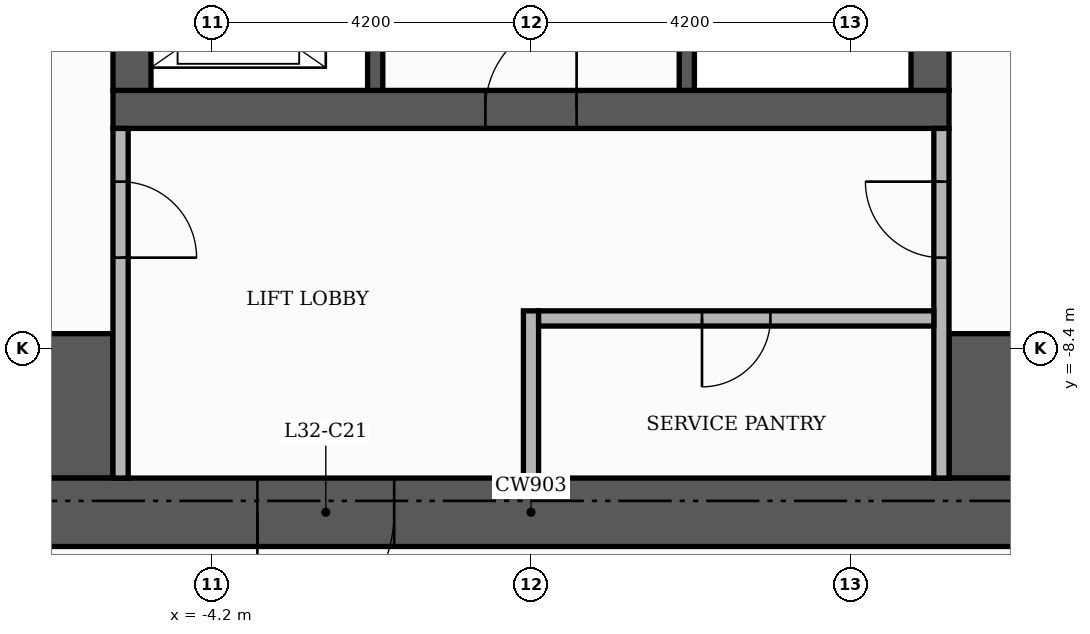
"""IFC4 building model, lengths in metres.
Left out: names, types, materials, properties, quantities, classifications, styles, units other than length and angle.
Written with IfcOpenShell. Run it as: python <this file> out.ifc"""

import sys

from ifc_helpers import new_model, si_unit, direction, frame, frame_2d, origin, place, context, subcontext, project, spatial, rectangle, extrude, element, fill, save


model = new_model("IFC4")
c1 = context("Model", 3, precision=1e-05, world=origin(), true_north=direction((0.0, 1.0)))
c2 = subcontext(c1, "Body", "Model", "MODEL_VIEW")
j1 = project(units=[si_unit("LENGTHUNIT", "METRE"), si_unit("PLANEANGLEUNIT", "RADIAN")], contexts=[c1])
p1 = place(None, origin())
s1 = spatial("IfcSite", under=j1, at=p1, CompositionType="ELEMENT")
p2 = place(p1, origin())
s2 = spatial("IfcBuilding", under=s1, at=p2, CompositionType="ELEMENT")
p3 = place(p2, frame((0.0, 0.0, 137.7)))
s3 = spatial("IfcBuildingStorey", under=s2, at=p3, CompositionType="ELEMENT", Elevation=137.7)
p4 = place(p3, frame((-5.5, -5.25, 0.0), z_axis=(0.0, 0.0, 1.0), x_axis=(1.0, 0.0, 0.0)))
e1 = element("IfcWall", 1, at=p4, inside=s3, PredefinedType="SHEAR", context=c2, shape_type="SweptSolid", body=[
    extrude(rectangle(XDim=11.0, YDim=0.5, at=frame_2d((5.5, 0.0))), origin(), (0.0, 0.0, 1.0), 3.48),
])
p5 = place(p4, frame((4.9, 0.0, 0.0)))
e2 = element("IfcOpeningElement", 2, at=p5, cuts=e1, PredefinedType="OPENING", context=c2, shape_type="SweptSolid", body=[
    extrude(rectangle(XDim=1.2, YDim=2.1, at=frame_2d((0.6, 1.05))), frame((0.0, 0.26, 0.0), z_axis=(0.0, -1.0, 0.0), x_axis=(1.0, 0.0, 0.0)), (0.0, 0.0, 1.0), 0.52),
])
for number, where, z_axis, x_axis in (
    (3, (-5.25, -5.0, 0.0), (0.0, 0.0, 1.0), (0.0, 1.0, 0.0)),
    (4, (5.25, -5.0, 0.0), (0.0, 0.0, 1.0), (0.0, 1.0, 0.0)),
):
    element("IfcWall", number, at=place(p3, frame(where, z_axis=z_axis, x_axis=x_axis)), inside=s3, PredefinedType="SHEAR", context=c2, shape_type="SweptSolid", body=[
        extrude(rectangle(XDim=10.5, YDim=0.5, at=frame_2d((5.25, 0.0))), origin(), (0.0, 0.0, 1.0), 3.48),
    ])
for number, where, z_axis, x_axis in (
    (5, (-10.1, -9.15, 0.0), (0.0, 0.0, 1.0), (1.0, 0.0, 0.0)),
    (6, (5.5, -9.15, 0.0), (0.0, 0.0, 1.0), (1.0, 0.0, 0.0)),
):
    element("IfcWall", number, at=place(p3, frame(where, z_axis=z_axis, x_axis=x_axis)), inside=s3, PredefinedType="SHEAR", context=c2, shape_type="SweptSolid", body=[
        extrude(rectangle(XDim=4.6, YDim=1.9, at=frame_2d((2.3, 0.0))), origin(), (0.0, 0.0, 1.0), 3.48),
    ])
p6 = place(p3, frame((2.05, -5.0, 0.0), z_axis=(0.0, 0.0, 1.0), x_axis=(0.0, 1.0, 0.0)))
e7 = element("IfcWall", 7, at=p6, inside=s3, PredefinedType="SHEAR", context=c2, shape_type="SweptSolid", body=[
    extrude(rectangle(XDim=6.6, YDim=0.2, at=frame_2d((3.3, 0.0))), origin(), (0.0, 0.0, 1.0), 3.48),
])
p7 = place(p6, frame((5.25, 0.0, 0.0)))
e8 = element("IfcOpeningElement", 8, at=p7, cuts=e7, PredefinedType="OPENING", context=c2, shape_type="SweptSolid", body=[
    extrude(rectangle(XDim=1.0, YDim=2.1, at=frame_2d((0.5, 1.05))), frame((0.0, 0.11, 0.0), z_axis=(0.0, -1.0, 0.0), x_axis=(1.0, 0.0, 0.0)), (0.0, 0.0, 1.0), 0.22),
])
p8 = place(p3, frame((-2.05, -5.0, 0.0), z_axis=(0.0, 0.0, 1.0), x_axis=(0.0, 1.0, 0.0)))
e9 = element("IfcWall", 9, at=p8, inside=s3, PredefinedType="SHEAR", context=c2, shape_type="SweptSolid", body=[
    extrude(rectangle(XDim=3.4, YDim=0.2, at=frame_2d((1.7, 0.0))), origin(), (0.0, 0.0, 1.0), 3.48),
])
p9 = place(p8, frame((0.55, 0.0, 0.0)))
e10 = element("IfcOpeningElement", 10, at=p9, cuts=e9, PredefinedType="OPENING", context=c2, shape_type="SweptSolid", body=[
    extrude(rectangle(XDim=1.1, YDim=2.1, at=frame_2d((0.55, 1.05))), frame((0.0, 0.11, 0.0), z_axis=(0.0, -1.0, 0.0), x_axis=(1.0, 0.0, 0.0)), (0.0, 0.0, 1.0), 0.22),
])
p10 = place(p8, frame((2.45, 0.0, 0.0)))
e11 = element("IfcOpeningElement", 11, at=p10, cuts=e9, PredefinedType="OPENING", context=c2, shape_type="SweptSolid", body=[
    extrude(rectangle(XDim=0.8, YDim=2.1, at=frame_2d((0.4, 1.05))), frame((0.0, 0.11, 0.0), z_axis=(0.0, -1.0, 0.0), x_axis=(1.0, 0.0, 0.0)), (0.0, 0.0, 1.0), 0.22),
])
p11 = place(p3, frame((-11.0, -10.55, 0.0), z_axis=(0.0, 0.0, 1.0), x_axis=(1.0, 0.0, 0.0)))
e12 = element("IfcWall", 12, at=p11, inside=s3, PredefinedType="SHEAR", context=c2, shape_type="SweptSolid", body=[
    extrude(rectangle(XDim=22.0, YDim=0.9, at=frame_2d((11.0, 0.0))), origin(), (0.0, 0.0, 1.0), 3.48),
])
p12 = place(p11, frame((7.4, 0.0, 0.0)))
e13 = element("IfcOpeningElement", 13, at=p12, cuts=e12, PredefinedType="OPENING", context=c2, shape_type="SweptSolid", body=[
    extrude(rectangle(XDim=1.8, YDim=2.2, at=frame_2d((0.9, 1.1))), frame((0.0, 0.46, 0.0), z_axis=(0.0, -1.0, 0.0), x_axis=(1.0, 0.0, 0.0)), (0.0, 0.0, 1.0), 0.92),
])
p13 = place(p3, frame((-5.4, -10.1, 0.0), z_axis=(0.0, 0.0, 1.0), x_axis=(0.0, 1.0, 0.0)))
e14 = element("IfcWall", 14, at=p13, inside=s3, PredefinedType="PARTITIONING", context=c2, shape_type="SweptSolid", body=[
    extrude(rectangle(XDim=4.6, YDim=0.2, at=frame_2d((2.3, 0.0))), origin(), (0.0, 0.0, 1.0), 3.48),
])
p14 = place(p13, frame((2.9, 0.0, 0.0)))
e15 = element("IfcOpeningElement", 15, at=p14, cuts=e14, PredefinedType="OPENING", context=c2, shape_type="SweptSolid", body=[
    extrude(rectangle(XDim=1.0, YDim=2.1, at=frame_2d((0.5, 1.05))), frame((0.0, 0.11, 0.0), z_axis=(0.0, -1.0, 0.0), x_axis=(1.0, 0.0, 0.0)), (0.0, 0.0, 1.0), 0.22),
])
p15 = place(p3, frame((0.0, -10.1, 0.0), z_axis=(0.0, 0.0, 1.0), x_axis=(0.0, 1.0, 0.0)))
e16 = element("IfcWall", 16, at=p15, inside=s3, PredefinedType="PARTITIONING", context=c2, shape_type="SweptSolid", body=[
    extrude(rectangle(XDim=2.2, YDim=0.2, at=frame_2d((1.1, 0.0))), origin(), (0.0, 0.0, 1.0), 3.48),
])
p16 = place(p3, frame((5.4, -10.1, 0.0), z_axis=(0.0, 0.0, 1.0), x_axis=(0.0, 1.0, 0.0)))
e17 = element("IfcWall", 17, at=p16, inside=s3, PredefinedType="PARTITIONING", context=c2, shape_type="SweptSolid", body=[
    extrude(rectangle(XDim=4.6, YDim=0.2, at=frame_2d((2.3, 0.0))), origin(), (0.0, 0.0, 1.0), 3.48),
])
p17 = place(p16, frame((2.9, 0.0, 0.0)))
e18 = element("IfcOpeningElement", 18, at=p17, cuts=e17, PredefinedType="OPENING", context=c2, shape_type="SweptSolid", body=[
    extrude(rectangle(XDim=1.0, YDim=2.1, at=frame_2d((0.5, 1.05))), frame((0.0, 0.11, 0.0), z_axis=(0.0, -1.0, 0.0), x_axis=(1.0, 0.0, 0.0)), (0.0, 0.0, 1.0), 0.22),
])
p18 = place(p3, frame((0.1, -8.0, 0.0), z_axis=(0.0, 0.0, 1.0), x_axis=(1.0, 0.0, 0.0)))
e19 = element("IfcWall", 19, at=p18, inside=s3, PredefinedType="PARTITIONING", context=c2, shape_type="SweptSolid", body=[
    extrude(rectangle(XDim=5.2, YDim=0.2, at=frame_2d((2.6, 0.0))), origin(), (0.0, 0.0, 1.0), 3.48),
])
p19 = place(p18, frame((2.15, 0.0, 0.0)))
e20 = element("IfcOpeningElement", 20, at=p19, cuts=e19, PredefinedType="OPENING", context=c2, shape_type="SweptSolid", body=[
    extrude(rectangle(XDim=0.9, YDim=2.1, at=frame_2d((0.45, 1.05))), frame((0.0, 0.11, 0.0), z_axis=(0.0, -1.0, 0.0), x_axis=(1.0, 0.0, 0.0)), (0.0, 0.0, 1.0), 0.22),
])
p20 = place(p5, origin())
e21 = element("IfcDoor", 21, at=p20, inside=s3, OperationType="SINGLE_SWING_RIGHT", PredefinedType="DOOR", context=c2, shape_type="SweptSolid", body=[
    extrude(rectangle(XDim=1.2, YDim=2.1, at=frame_2d((0.6, 1.05))), frame((0.0, 0.025, 0.0), z_axis=(0.0, -1.0, 0.0), x_axis=(1.0, 0.0, 0.0)), (0.0, 0.0, 1.0), 0.05),
])
fill(e2, e21)
p21 = place(p14, frame((1.0, 0.0, 0.0), z_axis=(0.0, 0.0, 1.0), x_axis=(-1.0, 0.0, 0.0)))
e22 = element("IfcDoor", 22, at=p21, inside=s3, OperationType="SINGLE_SWING_LEFT", PredefinedType="DOOR", context=c2, shape_type="SweptSolid", body=[
    extrude(rectangle(XDim=1.0, YDim=2.1, at=frame_2d((0.5, 1.05))), frame((0.0, 0.025, 0.0), z_axis=(0.0, -1.0, 0.0), x_axis=(1.0, 0.0, 0.0)), (0.0, 0.0, 1.0), 0.05),
])
fill(e15, e22)
p22 = place(p17, origin())
e23 = element("IfcDoor", 23, at=p22, inside=s3, OperationType="SINGLE_SWING_RIGHT", PredefinedType="DOOR", context=c2, shape_type="SweptSolid", body=[
    extrude(rectangle(XDim=1.0, YDim=2.1, at=frame_2d((0.5, 1.05))), frame((0.0, 0.025, 0.0), z_axis=(0.0, -1.0, 0.0), x_axis=(1.0, 0.0, 0.0)), (0.0, 0.0, 1.0), 0.05),
])
fill(e18, e23)
p23 = place(p12, frame((1.8, 0.0, 0.0), z_axis=(0.0, 0.0, 1.0), x_axis=(-1.0, 0.0, 0.0)))
e24 = element("IfcDoor", 24, at=p23, inside=s3, OperationType="DOUBLE_DOOR_SINGLE_SWING", PredefinedType="DOOR", context=c2, shape_type="SweptSolid", body=[
    extrude(rectangle(XDim=1.8, YDim=2.2, at=frame_2d((0.9, 1.1))), frame((0.0, 0.025, 0.0), z_axis=(0.0, -1.0, 0.0), x_axis=(1.0, 0.0, 0.0)), (0.0, 0.0, 1.0), 0.05),
])
fill(e13, e24)
p24 = place(p19, frame((0.9, 0.0, 0.0), z_axis=(0.0, 0.0, 1.0), x_axis=(-1.0, 0.0, 0.0)))
e25 = element("IfcDoor", 25, at=p24, inside=s3, OperationType="SINGLE_SWING_LEFT", PredefinedType="DOOR", context=c2, shape_type="SweptSolid", body=[
    extrude(rectangle(XDim=0.9, YDim=2.1, at=frame_2d((0.45, 1.05))), frame((0.0, 0.025, 0.0), z_axis=(0.0, -1.0, 0.0), x_axis=(1.0, 0.0, 0.0)), (0.0, 0.0, 1.0), 0.05),
])
fill(e20, e25)
save(model, sys.argv[1])
